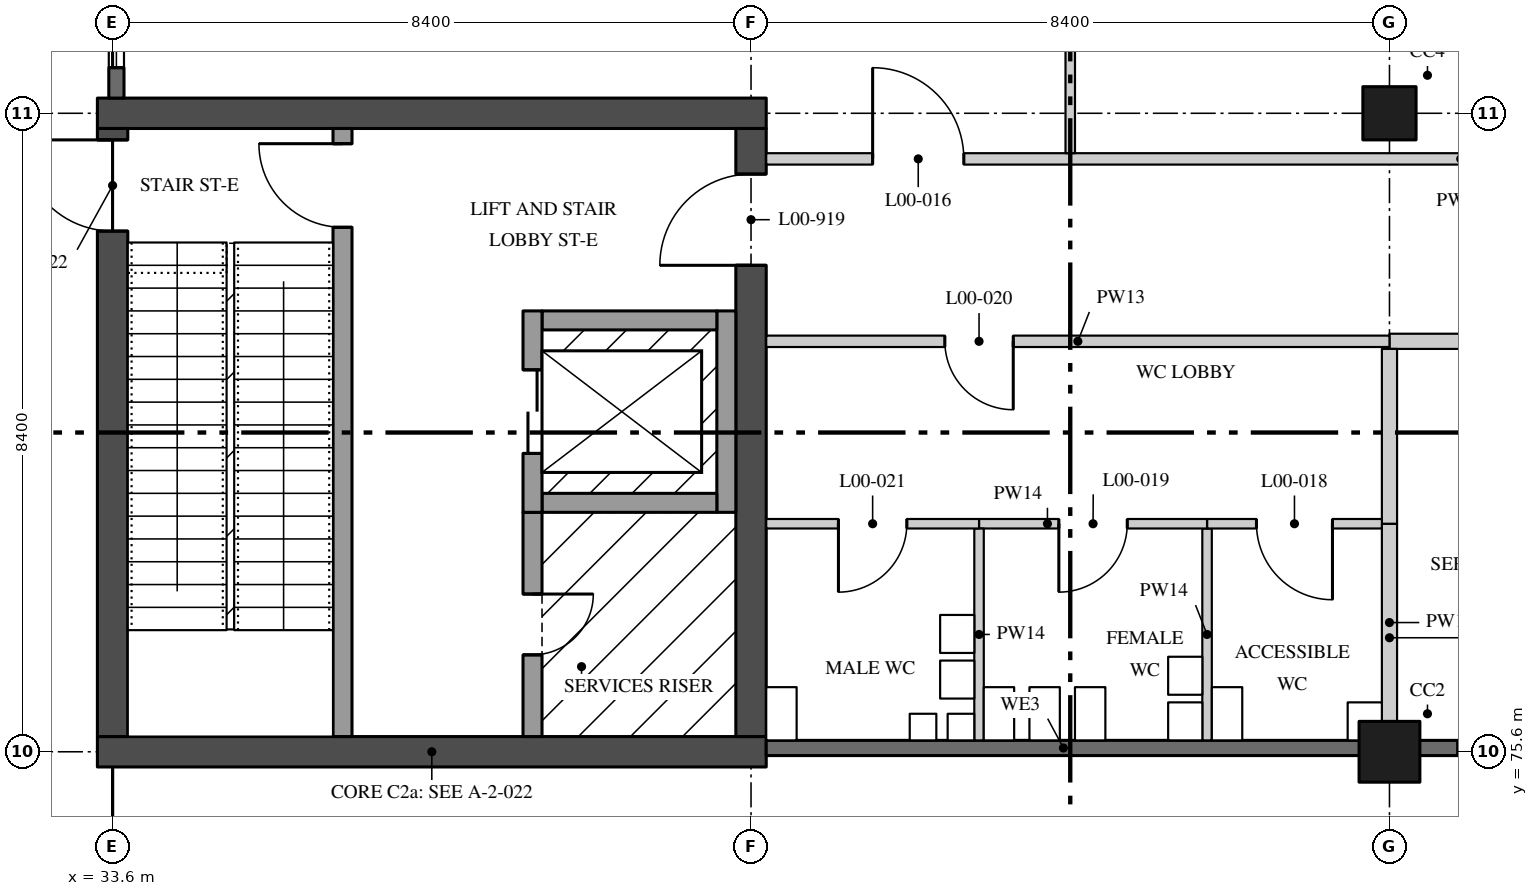
"""IFC4 building model, lengths in metres.
Left out: names, types, materials, properties, quantities, classifications, styles, units other than length and angle.
Written with IfcOpenShell. Run it as: python <this file> out.ifc"""

import sys

from ifc_helpers import new_model, si_unit, direction, frame, frame_2d, origin, origin_2d, place, context, subcontext, project, spatial, rectangle, extrude, element, fill, save


model = new_model("IFC4")
c1 = context("Model", 3, precision=1e-05, world=origin(), true_north=direction((0.0, 1.0)))
c2 = subcontext(c1, "Body", "Model", "MODEL_VIEW")
j1 = project(units=[si_unit("LENGTHUNIT", "METRE"), si_unit("PLANEANGLEUNIT", "RADIAN")], contexts=[c1])
p1 = place(None, origin())
s1 = spatial("IfcSite", under=j1, at=p1, CompositionType="ELEMENT")
p2 = place(p1, origin())
s2 = spatial("IfcBuilding", under=s1, at=p2, CompositionType="ELEMENT")
p3 = place(p2, origin())
s3 = spatial("IfcBuildingStorey", under=s2, at=p3, CompositionType="ELEMENT", Elevation=0.0)
p4 = place(p3, frame((50.4, 75.6, 0.0), z_axis=(0.0, 0.0, 1.0), x_axis=(1.0, 0.0, 0.0)))
e1 = element("IfcColumn", 1, at=p4, inside=s3, PredefinedType="COLUMN", context=c2, shape_type="SweptSolid", body=[
    extrude(rectangle(XDim=0.8, YDim=0.8, at=origin_2d()), origin(), (0.0, 0.0, 1.0), 5.05),
])
p5 = place(p3, frame((50.4, 84.0, 0.0), z_axis=(0.0, 0.0, 1.0), x_axis=(1.0, 0.0, 0.0)))
e2 = element("IfcColumn", 2, at=p5, inside=s3, PredefinedType="COLUMN", context=c2, shape_type="SweptSolid", body=[
    extrude(rectangle(XDim=0.7, YDim=0.7, at=origin_2d()), origin(), (0.0, 0.0, 1.0), 5.05),
])
for number, where, z_axis, x_axis in (
    (3, (33.4, 75.6, 0.0), (0.0, 0.0, 1.0), (1.0, 0.0, 0.0)),
    (4, (33.4, 84.0, 0.0), (0.0, 0.0, 1.0), (1.0, 0.0, 0.0)),
):
    element("IfcWall", number, at=place(p3, frame(where, z_axis=z_axis, x_axis=x_axis)), inside=s3, PredefinedType="SHEAR", context=c2, shape_type="SweptSolid", body=[
        extrude(rectangle(XDim=8.8, YDim=0.4, at=frame_2d((4.4, 0.0))), origin(), (0.0, 0.0, 1.0), 5.05),
    ])
p6 = place(p3, frame((33.6, 75.8, 0.0), z_axis=(0.0, 0.0, 1.0), x_axis=(0.0, 1.0, 0.0)))
e5 = element("IfcWall", 5, at=p6, inside=s3, PredefinedType="SHEAR", context=c2, shape_type="SweptSolid", body=[
    extrude(rectangle(XDim=8.0, YDim=0.4, at=frame_2d((4.0, 0.0))), origin(), (0.0, 0.0, 1.0), 5.05),
])
p7 = place(p6, frame((6.65, 0.0, 0.0)))
e6 = element("IfcOpeningElement", 6, at=p7, cuts=e5, PredefinedType="OPENING", context=c2, shape_type="SweptSolid", body=[
    extrude(rectangle(XDim=1.2, YDim=2.1, at=frame_2d((0.6, 1.05))), frame((0.0, 0.21, 0.0), z_axis=(0.0, -1.0, 0.0), x_axis=(1.0, 0.0, 0.0)), (0.0, 0.0, 1.0), 0.42),
])
p8 = place(p3, frame((42.0, 75.8, 0.0), z_axis=(0.0, 0.0, 1.0), x_axis=(0.0, 1.0, 0.0)))
e7 = element("IfcWall", 7, at=p8, inside=s3, PredefinedType="SHEAR", context=c2, shape_type="SweptSolid", body=[
    extrude(rectangle(XDim=8.0, YDim=0.4, at=frame_2d((4.0, 0.0))), origin(), (0.0, 0.0, 1.0), 5.05),
])
p9 = place(p8, frame((6.2, 0.0, 0.0)))
e8 = element("IfcOpeningElement", 8, at=p9, cuts=e7, PredefinedType="OPENING", context=c2, shape_type="SweptSolid", body=[
    extrude(rectangle(XDim=1.2, YDim=2.1, at=frame_2d((0.6, 1.05))), frame((0.0, 0.21, 0.0), z_axis=(0.0, -1.0, 0.0), x_axis=(1.0, 0.0, 0.0)), (0.0, 0.0, 1.0), 0.42),
])
p10 = place(p3, frame((36.625, 83.8, 0.0), z_axis=(0.0, 0.0, 1.0), x_axis=(0.0, -1.0, 0.0)))
e9 = element("IfcWall", 9, at=p10, inside=s3, PredefinedType="SOLIDWALL", context=c2, shape_type="SweptSolid", body=[
    extrude(rectangle(XDim=8.0, YDim=0.25, at=frame_2d((4.0, 0.0))), origin(), (0.0, 0.0, 1.0), 5.05),
])
p11 = place(p10, frame((0.2, 0.0, 0.0)))
e10 = element("IfcOpeningElement", 10, at=p11, cuts=e9, PredefinedType="OPENING", context=c2, shape_type="SweptSolid", body=[
    extrude(rectangle(XDim=1.1, YDim=2.1, at=frame_2d((0.55, 1.05))), frame((0.0, 0.135, 0.0), z_axis=(0.0, -1.0, 0.0), x_axis=(1.0, 0.0, 0.0)), (0.0, 0.0, 1.0), 0.27),
])
p12 = place(p3, frame((39.125, 78.75, 0.0), z_axis=(0.0, 0.0, 1.0), x_axis=(0.0, -1.0, 0.0)))
e11 = element("IfcWall", 11, at=p12, inside=s3, PredefinedType="SOLIDWALL", context=c2, shape_type="SweptSolid", body=[
    extrude(rectangle(XDim=2.95, YDim=0.25, at=frame_2d((1.475, 0.0))), origin(), (0.0, 0.0, 1.0), 5.05),
])
p13 = place(p12, frame((1.075, 0.0, 0.0)))
e12 = element("IfcOpeningElement", 12, at=p13, cuts=e11, PredefinedType="OPENING", context=c2, shape_type="SweptSolid", body=[
    extrude(rectangle(XDim=0.8, YDim=2.1, at=frame_2d((0.4, 1.05))), frame((0.0, 0.135, 0.0), z_axis=(0.0, -1.0, 0.0), x_axis=(1.0, 0.0, 0.0)), (0.0, 0.0, 1.0), 0.27),
])
p14 = place(p3, frame((41.675, 78.75, 0.0), z_axis=(0.0, 0.0, 1.0), x_axis=(0.0, 1.0, 0.0)))
e13 = element("IfcWall", 13, at=p14, inside=s3, PredefinedType="SOLIDWALL", context=c2, shape_type="SweptSolid", body=[
    extrude(rectangle(XDim=2.65, YDim=0.25, at=frame_2d((1.325, 0.0))), origin(), (0.0, 0.0, 1.0), 5.05),
])
for number, where, z_axis, x_axis in (
    (14, (39.25, 81.275, 0.0), (0.0, 0.0, 1.0), (1.0, 0.0, 0.0)),
    (15, (39.25, 78.875, 0.0), (0.0, 0.0, 1.0), (1.0, 0.0, 0.0)),
):
    element("IfcWall", number, at=place(p3, frame(where, z_axis=z_axis, x_axis=x_axis)), inside=s3, PredefinedType="SOLIDWALL", context=c2, shape_type="SweptSolid", body=[
        extrude(rectangle(XDim=2.3, YDim=0.25, at=frame_2d((1.15, 0.0))), origin(), (0.0, 0.0, 1.0), 5.05),
    ])
p15 = place(p3, frame((39.125, 78.75, 0.0), z_axis=(0.0, 0.0, 1.0), x_axis=(0.0, 1.0, 0.0)))
e16 = element("IfcWall", 16, at=p15, inside=s3, PredefinedType="SOLIDWALL", context=c2, shape_type="SweptSolid", body=[
    extrude(rectangle(XDim=2.65, YDim=0.25, at=frame_2d((1.325, 0.0))), origin(), (0.0, 0.0, 1.0), 5.05),
])
p16 = place(p15, frame((0.775, 0.0, 0.0)))
e17 = element("IfcOpeningElement", 17, at=p16, cuts=e16, PredefinedType="OPENING", context=c2, shape_type="SweptSolid", body=[
    extrude(rectangle(XDim=1.1, YDim=2.1, at=frame_2d((0.55, 1.05))), frame((0.0, 0.135, 0.0), z_axis=(0.0, -1.0, 0.0), x_axis=(1.0, 0.0, 0.0)), (0.0, 0.0, 1.0), 0.27),
])
p17 = place(p3, frame((46.2, 83.4, 0.0), z_axis=(0.0, 0.0, 1.0), x_axis=(1.0, 0.0, 0.0)))
e18 = element("IfcWall", 18, at=p17, inside=s3, PredefinedType="PARTITIONING", context=c2, shape_type="SweptSolid", body=[
    extrude(rectangle(XDim=10.275, YDim=0.15, at=frame_2d((5.138, 0.0))), origin(), (0.0, 0.0, 1.0), 5.05),
])
p18 = place(p3, frame((42.2, 83.4, 0.0), z_axis=(0.0, 0.0, 1.0), x_axis=(1.0, 0.0, 0.0)))
e19 = element("IfcWall", 19, at=p18, inside=s3, PredefinedType="PARTITIONING", context=c2, shape_type="SweptSolid", body=[
    extrude(rectangle(XDim=4.0, YDim=0.15, at=frame_2d((2.0, 0.0))), origin(), (0.0, 0.0, 1.0), 5.05),
])
p19 = place(p18, frame((1.4, 0.0, 0.0)))
e20 = element("IfcOpeningElement", 20, at=p19, cuts=e19, PredefinedType="OPENING", context=c2, shape_type="SweptSolid", body=[
    extrude(rectangle(XDim=1.2, YDim=2.4, at=frame_2d((0.6, 1.2))), frame((0.0, 0.085, 0.0), z_axis=(0.0, -1.0, 0.0), x_axis=(1.0, 0.0, 0.0)), (0.0, 0.0, 1.0), 0.17),
])
p20 = place(p3, frame((50.4, 81.0, 0.0), z_axis=(0.0, 0.0, 1.0), x_axis=(1.0, 0.0, 0.0)))
e21 = element("IfcWall", 21, at=p20, inside=s3, PredefinedType="PARTITIONING", context=c2, shape_type="SweptSolid", body=[
    extrude(rectangle(XDim=4.2, YDim=0.2, at=frame_2d((2.1, 0.0))), origin(), (0.0, 0.0, 1.0), 5.05),
])
p21 = place(p20, frame((1.6, 0.0, 0.0)))
e22 = element("IfcOpeningElement", 22, at=p21, cuts=e21, PredefinedType="OPENING", context=c2, shape_type="SweptSolid", body=[
    extrude(rectangle(XDim=1.0, YDim=2.1, at=frame_2d((0.5, 1.05))), frame((0.0, 0.11, 0.0), z_axis=(0.0, -1.0, 0.0), x_axis=(1.0, 0.0, 0.0)), (0.0, 0.0, 1.0), 0.22),
])
p22 = place(p3, frame((42.2, 81.0, 0.0), z_axis=(0.0, 0.0, 1.0), x_axis=(1.0, 0.0, 0.0)))
e23 = element("IfcWall", 23, at=p22, inside=s3, PredefinedType="PARTITIONING", context=c2, shape_type="SweptSolid", body=[
    extrude(rectangle(XDim=8.2, YDim=0.15, at=frame_2d((4.1, 0.0))), origin(), (0.0, 0.0, 1.0), 5.05),
])
p23 = place(p22, frame((2.35, 0.0, 0.0)))
e24 = element("IfcOpeningElement", 24, at=p23, cuts=e23, PredefinedType="OPENING", context=c2, shape_type="SweptSolid", body=[
    extrude(rectangle(XDim=0.9, YDim=2.1, at=frame_2d((0.45, 1.05))), frame((0.0, 0.085, 0.0), z_axis=(0.0, -1.0, 0.0), x_axis=(1.0, 0.0, 0.0)), (0.0, 0.0, 1.0), 0.17),
])
p24 = place(p3, frame((46.2, 83.475, 0.0), z_axis=(0.0, 0.0, 1.0), x_axis=(0.0, 1.0, 0.0)))
e25 = element("IfcWall", 25, at=p24, inside=s3, PredefinedType="PARTITIONING", context=c2, shape_type="SweptSolid", body=[
    extrude(rectangle(XDim=8.775, YDim=0.125, at=frame_2d((4.387, 0.0))), origin(), (0.0, 0.0, 1.0), 5.05),
])
p25 = place(p3, frame((50.4, 76.0, 0.0), z_axis=(0.0, 0.0, 1.0), x_axis=(0.0, 1.0, 0.0)))
e26 = element("IfcWall", 26, at=p25, inside=s3, PredefinedType="PARTITIONING", context=c2, shape_type="SweptSolid", body=[
    extrude(rectangle(XDim=2.6, YDim=0.2, at=frame_2d((1.3, 0.0))), origin(), (0.0, 0.0, 1.0), 5.05),
])
p26 = place(p3, frame((50.4, 78.6, 0.0), z_axis=(0.0, 0.0, 1.0), x_axis=(0.0, 1.0, 0.0)))
e27 = element("IfcWall", 27, at=p26, inside=s3, PredefinedType="PARTITIONING", context=c2, shape_type="SweptSolid", body=[
    extrude(rectangle(XDim=2.3, YDim=0.2, at=frame_2d((1.15, 0.0))), origin(), (0.0, 0.0, 1.0), 5.05),
])
p27 = place(p3, frame((48.0, 75.75, 0.0), z_axis=(0.0, 0.0, 1.0), x_axis=(0.0, 1.0, 0.0)))
e28 = element("IfcWall", 28, at=p27, inside=s3, PredefinedType="PARTITIONING", context=c2, shape_type="SweptSolid", body=[
    extrude(rectangle(XDim=2.787, YDim=0.125, at=frame_2d((1.394, 0.0))), origin(), (0.0, 0.0, 1.0), 5.05),
])
p28 = place(p3, frame((48.0, 78.6, 0.0), z_axis=(0.0, 0.0, 1.0), x_axis=(1.0, 0.0, 0.0)))
e29 = element("IfcWall", 29, at=p28, inside=s3, PredefinedType="PARTITIONING", context=c2, shape_type="SweptSolid", body=[
    extrude(rectangle(XDim=2.3, YDim=0.125, at=frame_2d((1.15, 0.0))), origin(), (0.0, 0.0, 1.0), 5.05),
])
p29 = place(p28, frame((0.65, 0.0, 0.0)))
e30 = element("IfcOpeningElement", 30, at=p29, cuts=e29, PredefinedType="OPENING", context=c2, shape_type="SweptSolid", body=[
    extrude(rectangle(XDim=1.0, YDim=2.1, at=frame_2d((0.5, 1.05))), frame((0.0, 0.073, 0.0), z_axis=(0.0, -1.0, 0.0), x_axis=(1.0, 0.0, 0.0)), (0.0, 0.0, 1.0), 0.145),
])
p30 = place(p3, frame((45.0, 78.6, 0.0), z_axis=(0.0, 0.0, 1.0), x_axis=(1.0, 0.0, 0.0)))
e31 = element("IfcWall", 31, at=p30, inside=s3, PredefinedType="PARTITIONING", context=c2, shape_type="SweptSolid", body=[
    extrude(rectangle(XDim=3.0, YDim=0.125, at=frame_2d((1.5, 0.0))), origin(), (0.0, 0.0, 1.0), 5.05),
])
p31 = place(p30, frame((1.05, 0.0, 0.0)))
e32 = element("IfcOpeningElement", 32, at=p31, cuts=e31, PredefinedType="OPENING", context=c2, shape_type="SweptSolid", body=[
    extrude(rectangle(XDim=0.9, YDim=2.1, at=frame_2d((0.45, 1.05))), frame((0.0, 0.073, 0.0), z_axis=(0.0, -1.0, 0.0), x_axis=(1.0, 0.0, 0.0)), (0.0, 0.0, 1.0), 0.145),
])
p32 = place(p3, frame((45.0, 75.75, 0.0), z_axis=(0.0, 0.0, 1.0), x_axis=(0.0, 1.0, 0.0)))
e33 = element("IfcWall", 33, at=p32, inside=s3, PredefinedType="PARTITIONING", context=c2, shape_type="SweptSolid", body=[
    extrude(rectangle(XDim=2.787, YDim=0.125, at=frame_2d((1.394, 0.0))), origin(), (0.0, 0.0, 1.0), 5.05),
])
p33 = place(p3, frame((42.2, 78.6, 0.0), z_axis=(0.0, 0.0, 1.0), x_axis=(1.0, 0.0, 0.0)))
e34 = element("IfcWall", 34, at=p33, inside=s3, PredefinedType="PARTITIONING", context=c2, shape_type="SweptSolid", body=[
    extrude(rectangle(XDim=2.8, YDim=0.125, at=frame_2d((1.4, 0.0))), origin(), (0.0, 0.0, 1.0), 5.05),
])
p34 = place(p33, frame((0.95, 0.0, 0.0)))
e35 = element("IfcOpeningElement", 35, at=p34, cuts=e34, PredefinedType="OPENING", context=c2, shape_type="SweptSolid", body=[
    extrude(rectangle(XDim=0.9, YDim=2.1, at=frame_2d((0.45, 1.05))), frame((0.0, 0.073, 0.0), z_axis=(0.0, -1.0, 0.0), x_axis=(1.0, 0.0, 0.0)), (0.0, 0.0, 1.0), 0.145),
])
p35 = place(p3, frame((33.65, 92.02, 0.0), z_axis=(0.0, 0.0, 1.0), x_axis=(0.0, -1.0, 0.0)))
e36 = element("IfcWall", 36, at=p35, inside=s3, PredefinedType="SOLIDWALL", context=c2, shape_type="SweptSolid", body=[
    extrude(rectangle(XDim=7.82, YDim=0.2, at=frame_2d((3.91, 0.0))), origin(), (0.0, 0.0, 1.0), 5.05),
])
p36 = place(p35, frame((1.22, 0.0, 0.0)))
e37 = element("IfcOpeningElement", 37, at=p36, cuts=e36, PredefinedType="OPENING", context=c2, shape_type="SweptSolid", body=[
    extrude(rectangle(XDim=1.0, YDim=2.4, at=frame_2d((0.5, 1.2))), frame((0.0, 0.11, 0.0), z_axis=(0.0, -1.0, 0.0), x_axis=(1.0, 0.0, 0.0)), (0.0, 0.0, 1.0), 0.22),
])
p37 = place(p35, frame((4.42, 0.0, 0.9)))
e38 = element("IfcOpeningElement", 38, at=p37, cuts=e36, PredefinedType="OPENING", context=c2, shape_type="SweptSolid", body=[
    extrude(rectangle(XDim=3.0, YDim=2.85, at=frame_2d((1.5, 1.425))), frame((0.0, 0.11, 0.0), z_axis=(0.0, -1.0, 0.0), x_axis=(1.0, 0.0, 0.0)), (0.0, 0.0, 1.0), 0.22),
])
p38 = place(p3, frame((42.2, 75.65, 0.0), z_axis=(0.0, 0.0, 1.0), x_axis=(1.0, 0.0, 0.0)))
e39 = element("IfcWall", 39, at=p38, inside=s3, PredefinedType="SOLIDWALL", context=c2, shape_type="SweptSolid", body=[
    extrude(rectangle(XDim=7.82, YDim=0.2, at=frame_2d((3.91, 0.0))), origin(), (0.0, 0.0, 1.0), 5.05),
])
p39 = place(p3, frame((50.78, 75.65, 0.0), z_axis=(0.0, 0.0, 1.0), x_axis=(1.0, 0.0, 0.0)))
e40 = element("IfcWall", 40, at=p39, inside=s3, PredefinedType="SOLIDWALL", context=c2, shape_type="SweptSolid", body=[
    extrude(rectangle(XDim=7.64, YDim=0.2, at=frame_2d((3.82, 0.0))), origin(), (0.0, 0.0, 1.0), 5.05),
])
p40 = place(p39, frame((0.52, 0.0, 0.9)))
e41 = element("IfcOpeningElement", 41, at=p40, cuts=e40, PredefinedType="OPENING", context=c2, shape_type="SweptSolid", body=[
    extrude(rectangle(XDim=2.4, YDim=2.85, at=frame_2d((1.2, 1.425))), frame((0.0, 0.11, 0.0), z_axis=(0.0, -1.0, 0.0), x_axis=(1.0, 0.0, 0.0)), (0.0, 0.0, 1.0), 0.22),
])
p41 = place(p9, origin())
e42 = element("IfcDoor", 42, at=p41, inside=s3, OperationType="SINGLE_SWING_RIGHT", PredefinedType="DOOR", context=c2, shape_type="SweptSolid", body=[
    extrude(rectangle(XDim=1.2, YDim=2.1, at=frame_2d((0.6, 1.05))), frame((0.0, 0.035, 0.0), z_axis=(0.0, -1.0, 0.0), x_axis=(1.0, 0.0, 0.0)), (0.0, 0.0, 1.0), 0.07),
])
fill(e8, e42)
p42 = place(p13, origin())
e43 = element("IfcDoor", 43, at=p42, inside=s3, OperationType="SINGLE_SWING_RIGHT", PredefinedType="DOOR", context=c2, shape_type="SweptSolid", body=[
    extrude(rectangle(XDim=0.8, YDim=2.1, at=frame_2d((0.4, 1.05))), frame((0.0, 0.035, 0.0), z_axis=(0.0, -1.0, 0.0), x_axis=(1.0, 0.0, 0.0)), (0.0, 0.0, 1.0), 0.07),
])
fill(e12, e43)
p43 = place(p11, frame((1.1, 0.0, 0.0), z_axis=(0.0, 0.0, 1.0), x_axis=(-1.0, 0.0, 0.0)))
e44 = element("IfcDoor", 44, at=p43, inside=s3, OperationType="SINGLE_SWING_LEFT", PredefinedType="DOOR", context=c2, shape_type="SweptSolid", body=[
    extrude(rectangle(XDim=1.1, YDim=2.1, at=frame_2d((0.55, 1.05))), frame((0.0, 0.035, 0.0), z_axis=(0.0, -1.0, 0.0), x_axis=(1.0, 0.0, 0.0)), (0.0, 0.0, 1.0), 0.07),
])
fill(e10, e44)
p44 = place(p7, origin())
e45 = element("IfcDoor", 45, at=p44, inside=s3, OperationType="SINGLE_SWING_LEFT", PredefinedType="DOOR", context=c2, shape_type="SweptSolid", body=[
    extrude(rectangle(XDim=1.2, YDim=2.1, at=frame_2d((0.6, 1.05))), frame((0.0, 0.035, 0.0), z_axis=(0.0, -1.0, 0.0), x_axis=(1.0, 0.0, 0.0)), (0.0, 0.0, 1.0), 0.07),
])
fill(e6, e45)
p45 = place(p16, origin())
e46 = element("IfcDoor", 46, at=p45, inside=s3, OperationType="DOUBLE_DOOR_SLIDING", PredefinedType="DOOR", context=c2, shape_type="SweptSolid", body=[
    extrude(rectangle(XDim=1.1, YDim=2.1, at=frame_2d((0.55, 1.05))), frame((0.0, 0.04, 0.0), z_axis=(0.0, -1.0, 0.0), x_axis=(1.0, 0.0, 0.0)), (0.0, 0.0, 1.0), 0.08),
])
fill(e17, e46)
p46 = place(p19, origin())
e47 = element("IfcDoor", 47, at=p46, inside=s3, OperationType="SINGLE_SWING_RIGHT", PredefinedType="DOOR", context=c2, shape_type="SweptSolid", body=[
    extrude(rectangle(XDim=1.2, YDim=2.4, at=frame_2d((0.6, 1.2))), frame((0.0, 0.025, 0.0), z_axis=(0.0, -1.0, 0.0), x_axis=(1.0, 0.0, 0.0)), (0.0, 0.0, 1.0), 0.05),
])
fill(e20, e47)
p47 = place(p29, frame((1.0, 0.0, 0.0), z_axis=(0.0, 0.0, 1.0), x_axis=(-1.0, 0.0, 0.0)))
e48 = element("IfcDoor", 48, at=p47, inside=s3, OperationType="SINGLE_SWING_RIGHT", PredefinedType="DOOR", context=c2, shape_type="SweptSolid", body=[
    extrude(rectangle(XDim=1.0, YDim=2.1, at=frame_2d((0.5, 1.05))), frame((0.0, 0.02, 0.0), z_axis=(0.0, -1.0, 0.0), x_axis=(1.0, 0.0, 0.0)), (0.0, 0.0, 1.0), 0.04),
])
fill(e30, e48)
p48 = place(p31, frame((0.9, 0.0, 0.0), z_axis=(0.0, 0.0, 1.0), x_axis=(-1.0, 0.0, 0.0)))
e49 = element("IfcDoor", 49, at=p48, inside=s3, OperationType="SINGLE_SWING_LEFT", PredefinedType="DOOR", context=c2, shape_type="SweptSolid", body=[
    extrude(rectangle(XDim=0.9, YDim=2.1, at=frame_2d((0.45, 1.05))), frame((0.0, 0.02, 0.0), z_axis=(0.0, -1.0, 0.0), x_axis=(1.0, 0.0, 0.0)), (0.0, 0.0, 1.0), 0.04),
])
fill(e32, e49)
p49 = place(p23, frame((0.9, 0.0, 0.0), z_axis=(0.0, 0.0, 1.0), x_axis=(-1.0, 0.0, 0.0)))
e50 = element("IfcDoor", 50, at=p49, inside=s3, OperationType="SINGLE_SWING_RIGHT", PredefinedType="DOOR", context=c2, shape_type="SweptSolid", body=[
    extrude(rectangle(XDim=0.9, YDim=2.1, at=frame_2d((0.45, 1.05))), frame((0.0, 0.025, 0.0), z_axis=(0.0, -1.0, 0.0), x_axis=(1.0, 0.0, 0.0)), (0.0, 0.0, 1.0), 0.05),
])
fill(e24, e50)
p50 = place(p34, frame((0.9, 0.0, 0.0), z_axis=(0.0, 0.0, 1.0), x_axis=(-1.0, 0.0, 0.0)))
e51 = element("IfcDoor", 51, at=p50, inside=s3, OperationType="SINGLE_SWING_LEFT", PredefinedType="DOOR", context=c2, shape_type="SweptSolid", body=[
    extrude(rectangle(XDim=0.9, YDim=2.1, at=frame_2d((0.45, 1.05))), frame((0.0, 0.02, 0.0), z_axis=(0.0, -1.0, 0.0), x_axis=(1.0, 0.0, 0.0)), (0.0, 0.0, 1.0), 0.04),
])
fill(e35, e51)
p51 = place(p37, origin())
e52 = element("IfcWindow", 52, at=p51, inside=s3, PartitioningType="SINGLE_PANEL", PredefinedType="WINDOW", context=c2, shape_type="SweptSolid", body=[
    extrude(rectangle(XDim=3.0, YDim=2.85, at=frame_2d((1.5, 1.425))), frame((0.0, 0.05, 0.0), z_axis=(0.0, -1.0, 0.0), x_axis=(1.0, 0.0, 0.0)), (0.0, 0.0, 1.0), 0.1),
])
fill(e38, e52)
save(model, sys.argv[1])
